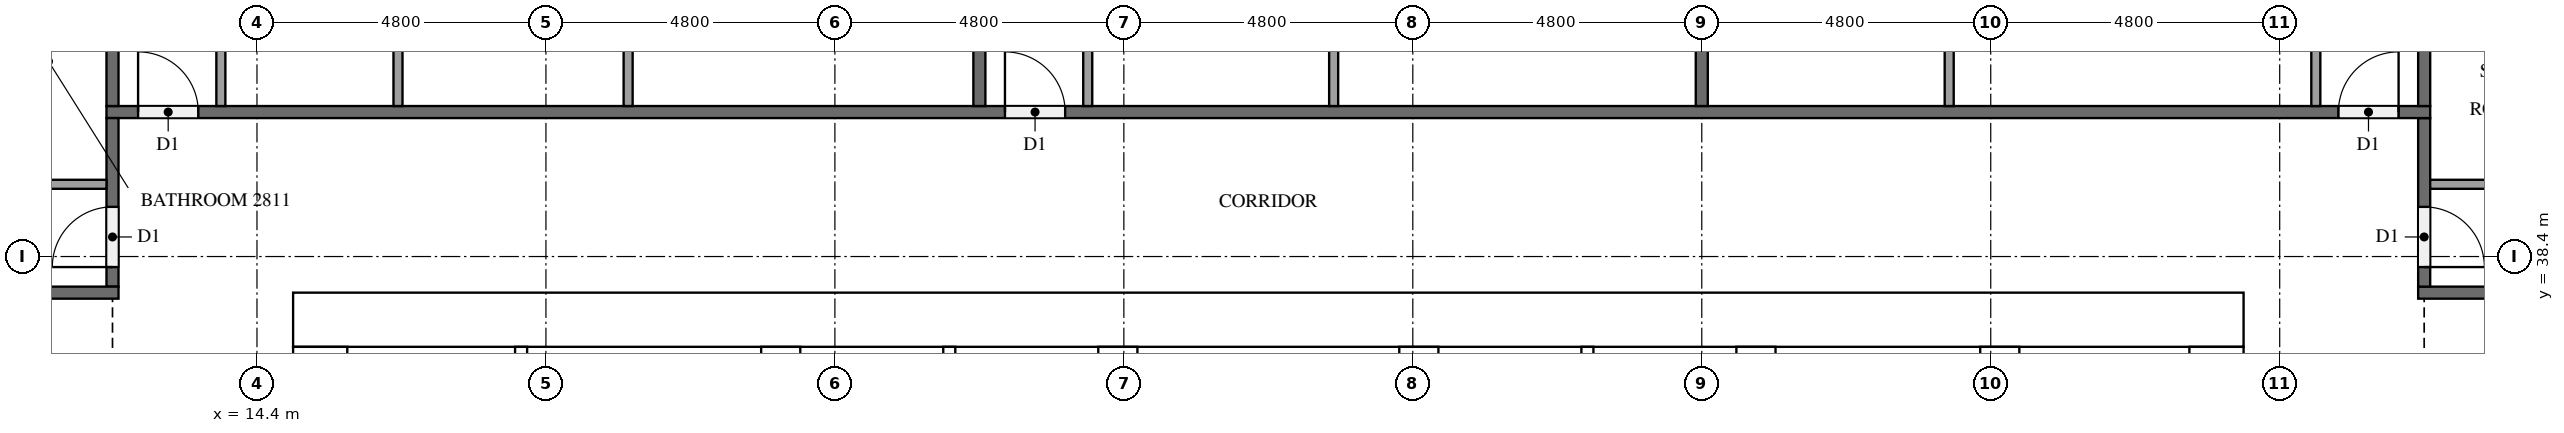
"""IFC4 building model, lengths in metres.
Left out: names, types, materials, properties, quantities, classifications, styles, units other than length and angle.
Written with IfcOpenShell. Run it as: python <this file> out.ifc"""

import sys

from ifc_helpers import new_model, si_unit, direction, frame, frame_2d, origin, place, context, subcontext, project, spatial, rectangle, extrude, element, fill, save


model = new_model("IFC4")
c1 = context("Model", 3, precision=1e-05, world=origin(), true_north=direction((0.0, 1.0)))
c2 = subcontext(c1, "Body", "Model", "MODEL_VIEW")
j1 = project(units=[si_unit("LENGTHUNIT", "METRE"), si_unit("PLANEANGLEUNIT", "RADIAN")], contexts=[c1])
p1 = place(None, origin())
s1 = spatial("IfcSite", under=j1, at=p1, CompositionType="ELEMENT")
p2 = place(p1, origin())
s2 = spatial("IfcBuilding", under=s1, at=p2, CompositionType="ELEMENT")
p3 = place(p2, frame((0.0, 0.0, 110.2)))
s3 = spatial("IfcBuildingStorey", under=s2, at=p3, CompositionType="ELEMENT", Elevation=110.2)
p4 = place(p3, frame((15.0, 37.35, 0.0), z_axis=(0.0, 0.0, 1.0), x_axis=(1.0, 0.0, 0.0)))
e1 = element("IfcWall", 1, at=p4, inside=s3, PredefinedType="SHEAR", context=c2, shape_type="SweptSolid", body=[
    extrude(rectangle(XDim=32.4, YDim=0.9, at=frame_2d((16.2, 0.0))), origin(), (0.0, 0.0, 1.0), 3.1),
])
p5 = place(p4, frame((15.3, 0.0, 0.0)))
e2 = element("IfcOpeningElement", 2, at=p5, cuts=e1, PredefinedType="OPENING", context=c2, shape_type="SweptSolid", body=[
    extrude(rectangle(XDim=1.8, YDim=2.1, at=frame_2d((0.9, 1.05))), frame((0.0, 0.46, 0.0), z_axis=(0.0, -1.0, 0.0), x_axis=(1.0, 0.0, 0.0)), (0.0, 0.0, 1.0), 0.92),
])
p6 = place(p4, frame((1.794, 0.0, 0.0)))
e3 = element("IfcOpeningElement", 3, at=p6, cuts=e1, PredefinedType="OPENING", context=c2, shape_type="SweptSolid", body=[
    extrude(rectangle(XDim=1.0, YDim=2.1, at=frame_2d((0.5, 1.05))), frame((0.0, 0.46, 0.0), z_axis=(0.0, -1.0, 0.0), x_axis=(1.0, 0.0, 0.0)), (0.0, 0.0, 1.0), 0.92),
])
p7 = place(p4, frame((5.331, 0.0, 0.0)))
e4 = element("IfcOpeningElement", 4, at=p7, cuts=e1, PredefinedType="OPENING", context=c2, shape_type="SweptSolid", body=[
    extrude(rectangle(XDim=1.0, YDim=2.1, at=frame_2d((0.5, 1.05))), frame((0.0, 0.46, 0.0), z_axis=(0.0, -1.0, 0.0), x_axis=(1.0, 0.0, 0.0)), (0.0, 0.0, 1.0), 0.92),
])
p8 = place(p3, frame((15.45, 15.9, 0.0), z_axis=(0.0, 0.0, 1.0), x_axis=(0.0, 1.0, 0.0)))
e5 = element("IfcWall", 5, at=p8, inside=s3, PredefinedType="SHEAR", context=c2, shape_type="SweptSolid", body=[
    extrude(rectangle(XDim=21.0, YDim=0.9, at=frame_2d((10.5, 0.0))), origin(), (0.0, 0.0, 1.0), 3.1),
])
p9 = place(p8, frame((4.86, 0.0, 0.0)))
e6 = element("IfcOpeningElement", 6, at=p9, cuts=e5, PredefinedType="OPENING", context=c2, shape_type="SweptSolid", body=[
    extrude(rectangle(XDim=1.2, YDim=2.1, at=frame_2d((0.6, 1.05))), frame((0.0, 0.46, 0.0), z_axis=(0.0, -1.0, 0.0), x_axis=(1.0, 0.0, 0.0)), (0.0, 0.0, 1.0), 0.92),
])
p10 = place(p3, frame((46.95, 15.9, 0.0), z_axis=(0.0, 0.0, 1.0), x_axis=(0.0, 1.0, 0.0)))
e7 = element("IfcWall", 7, at=p10, inside=s3, PredefinedType="SHEAR", context=c2, shape_type="SweptSolid", body=[
    extrude(rectangle(XDim=21.0, YDim=0.9, at=frame_2d((10.5, 0.0))), origin(), (0.0, 0.0, 1.0), 3.1),
])
p11 = place(p10, frame((10.2, 0.0, 0.0)))
e8 = element("IfcOpeningElement", 8, at=p11, cuts=e7, PredefinedType="OPENING", context=c2, shape_type="SweptSolid", body=[
    extrude(rectangle(XDim=1.2, YDim=2.1, at=frame_2d((0.6, 1.05))), frame((0.0, 0.46, 0.0), z_axis=(0.0, -1.0, 0.0), x_axis=(1.0, 0.0, 0.0)), (0.0, 0.0, 1.0), 0.92),
])
p12 = place(p3, frame((23.1, 15.9, 0.0), z_axis=(0.0, 0.0, 1.0), x_axis=(0.0, 1.0, 0.0)))
e9 = element("IfcWall", 9, at=p12, inside=s3, PredefinedType="SHEAR", context=c2, shape_type="SweptSolid", body=[
    extrude(rectangle(XDim=21.0, YDim=0.65, at=frame_2d((10.5, 0.0))), origin(), (0.0, 0.0, 1.0), 3.1),
])
p13 = place(p3, frame((39.3, 27.75, 0.0), z_axis=(0.0, 0.0, 1.0), x_axis=(0.0, 1.0, 0.0)))
e10 = element("IfcWall", 10, at=p13, inside=s3, PredefinedType="SHEAR", context=c2, shape_type="SweptSolid", body=[
    extrude(rectangle(XDim=9.15, YDim=0.65, at=frame_2d((4.575, 0.0))), origin(), (0.0, 0.0, 1.0), 3.1),
])
p14 = place(p3, frame((43.35, 27.75, 0.0), z_axis=(0.0, 0.0, 1.0), x_axis=(0.0, 1.0, 0.0)))
e11 = element("IfcWall", 11, at=p14, inside=s3, PredefinedType="SHEAR", context=c2, shape_type="SweptSolid", body=[
    extrude(rectangle(XDim=9.15, YDim=0.65, at=frame_2d((4.575, 0.0))), origin(), (0.0, 0.0, 1.0), 3.1),
])
p15 = place(p14, frame((7.65, 0.0, 0.0)))
e12 = element("IfcOpeningElement", 12, at=p15, cuts=e11, PredefinedType="OPENING", context=c2, shape_type="SweptSolid", body=[
    extrude(rectangle(XDim=1.2, YDim=2.1, at=frame_2d((0.6, 1.05))), frame((0.0, 0.335, 0.0), z_axis=(0.0, -1.0, 0.0), x_axis=(1.0, 0.0, 0.0)), (0.0, 0.0, 1.0), 0.67),
])
for number, where, z_axis, x_axis in (
    (13, (28.7, 33.875, 0.0), (0.0, 0.0, 1.0), (0.0, 1.0, 0.0)),
    (14, (33.7, 33.875, 0.0), (0.0, 0.0, 1.0), (0.0, 1.0, 0.0)),
):
    element("IfcWall", number, at=place(p3, frame(where, z_axis=z_axis, x_axis=x_axis)), inside=s3, PredefinedType="SHEAR", context=c2, shape_type="SweptSolid", body=[
        extrude(rectangle(XDim=3.025, YDim=0.65, at=frame_2d((1.512, 0.0))), origin(), (0.0, 0.0, 1.0), 3.1),
    ])
for number, where, z_axis, x_axis in (
    (15, (25.9, 33.875, 0.0), (0.0, 0.0, 1.0), (0.0, 1.0, 0.0)),
    (16, (36.5, 33.875, 0.0), (0.0, 0.0, 1.0), (0.0, 1.0, 0.0)),
):
    element("IfcWall", number, at=place(p3, frame(where, z_axis=z_axis, x_axis=x_axis)), inside=s3, PredefinedType="SOLIDWALL", context=c2, shape_type="SweptSolid", body=[
        extrude(rectangle(XDim=3.025, YDim=0.2, at=frame_2d((1.512, 0.0))), origin(), (0.0, 0.0, 1.0), 3.1),
    ])
p16 = place(p3, frame((18.788, 31.575, 0.0), z_axis=(0.0, 0.0, 1.0), x_axis=(0.0, 1.0, 0.0)))
e17 = element("IfcWall", 17, at=p16, inside=s3, PredefinedType="PARTITIONING", context=c2, shape_type="SweptSolid", body=[
    extrude(rectangle(XDim=5.325, YDim=0.2, at=frame_2d((2.663, 0.0))), origin(), (0.0, 0.0, 1.0), 3.1),
])
p17 = place(p3, frame((52.5, 37.8, 0.0), z_axis=(0.0, 0.0, 1.0), x_axis=(-1.0, 0.0, 0.0)))
e18 = element("IfcWall", 18, at=p17, inside=s3, PredefinedType="PARTITIONING", context=c2, shape_type="SweptSolid", body=[
    extrude(rectangle(XDim=2.2, YDim=0.2, at=frame_2d((1.1, 0.0))), origin(), (0.0, 0.0, 1.0), 3.1),
])
p18 = place(p3, frame((50.4, 40.7, 0.0), z_axis=(0.0, 0.0, 1.0), x_axis=(0.0, -1.0, 0.0)))
e19 = element("IfcWall", 19, at=p18, inside=s3, PredefinedType="PARTITIONING", context=c2, shape_type="SweptSolid", body=[
    extrude(rectangle(XDim=2.8, YDim=0.2, at=frame_2d((1.4, 0.0))), origin(), (0.0, 0.0, 1.0), 3.1),
])
p19 = place(p18, frame((1.475, 0.0, 0.0)))
e20 = element("IfcOpeningElement", 20, at=p19, cuts=e19, PredefinedType="OPENING", context=c2, shape_type="SweptSolid", body=[
    extrude(rectangle(XDim=1.0, YDim=2.1, at=frame_2d((0.5, 1.05))), frame((0.0, 0.11, 0.0), z_axis=(0.0, -1.0, 0.0), x_axis=(1.0, 0.0, 0.0)), (0.0, 0.0, 1.0), 0.22),
])
p20 = place(p3, frame((11.9, 40.8, 0.0), z_axis=(0.0, 0.0, 1.0), x_axis=(1.0, 0.0, 0.0)))
e21 = element("IfcWall", 21, at=p20, inside=s3, PredefinedType="PARTITIONING", context=c2, shape_type="SweptSolid", body=[
    extrude(rectangle(XDim=38.6, YDim=0.2, at=frame_2d((19.3, 0.0))), origin(), (0.0, 0.0, 1.0), 3.1),
])
p21 = place(p20, frame((37.075, 0.0, 0.0)))
e22 = element("IfcOpeningElement", 22, at=p21, cuts=e21, PredefinedType="OPENING", context=c2, shape_type="SweptSolid", body=[
    extrude(rectangle(XDim=1.0, YDim=2.1, at=frame_2d((0.5, 1.05))), frame((0.0, 0.11, 0.0), z_axis=(0.0, -1.0, 0.0), x_axis=(1.0, 0.0, 0.0)), (0.0, 0.0, 1.0), 0.22),
])
p22 = place(p20, frame((14.925, 0.0, 0.0)))
e23 = element("IfcOpeningElement", 23, at=p22, cuts=e21, PredefinedType="OPENING", context=c2, shape_type="SweptSolid", body=[
    extrude(rectangle(XDim=1.0, YDim=2.1, at=frame_2d((0.5, 1.05))), frame((0.0, 0.11, 0.0), z_axis=(0.0, -1.0, 0.0), x_axis=(1.0, 0.0, 0.0)), (0.0, 0.0, 1.0), 0.22),
])
p23 = place(p20, frame((0.525, 0.0, 0.0)))
e24 = element("IfcOpeningElement", 24, at=p23, cuts=e21, PredefinedType="OPENING", context=c2, shape_type="SweptSolid", body=[
    extrude(rectangle(XDim=1.0, YDim=2.1, at=frame_2d((0.5, 1.05))), frame((0.0, 0.11, 0.0), z_axis=(0.0, -1.0, 0.0), x_axis=(1.0, 0.0, 0.0)), (0.0, 0.0, 1.0), 0.22),
])
p24 = place(p3, frame((12.0, 37.9, 0.0), z_axis=(0.0, 0.0, 1.0), x_axis=(0.0, 1.0, 0.0)))
e25 = element("IfcWall", 25, at=p24, inside=s3, PredefinedType="PARTITIONING", context=c2, shape_type="SweptSolid", body=[
    extrude(rectangle(XDim=2.8, YDim=0.2, at=frame_2d((1.4, 0.0))), origin(), (0.0, 0.0, 1.0), 3.1),
])
p25 = place(p24, frame((0.325, 0.0, 0.0)))
e26 = element("IfcOpeningElement", 26, at=p25, cuts=e25, PredefinedType="OPENING", context=c2, shape_type="SweptSolid", body=[
    extrude(rectangle(XDim=1.0, YDim=2.1, at=frame_2d((0.5, 1.05))), frame((0.0, 0.11, 0.0), z_axis=(0.0, -1.0, 0.0), x_axis=(1.0, 0.0, 0.0)), (0.0, 0.0, 1.0), 0.22),
])
p26 = place(p3, frame((12.1, 37.8, 0.0), z_axis=(0.0, 0.0, 1.0), x_axis=(-1.0, 0.0, 0.0)))
e27 = element("IfcWall", 27, at=p26, inside=s3, PredefinedType="PARTITIONING", context=c2, shape_type="SweptSolid", body=[
    extrude(rectangle(XDim=2.2, YDim=0.2, at=frame_2d((1.1, 0.0))), origin(), (0.0, 0.0, 1.0), 3.1),
])
p27 = place(p3, frame((50.4, 40.9, 0.0), z_axis=(0.0, 0.0, 1.0), x_axis=(0.0, 1.0, 0.0)))
e28 = element("IfcWall", 28, at=p27, inside=s3, PredefinedType="PARTITIONING", context=c2, shape_type="SweptSolid", body=[
    extrude(rectangle(XDim=11.8, YDim=0.2, at=frame_2d((5.9, 0.0))), origin(), (0.0, 0.0, 1.0), 3.1),
])
p28 = place(p3, frame((38.4, 52.375, 0.0), z_axis=(0.0, 0.0, 1.0), x_axis=(0.0, -1.0, 0.0)))
e29 = element("IfcWall", 29, at=p28, inside=s3, PredefinedType="PARTITIONING", context=c2, shape_type="SweptSolid", body=[
    extrude(rectangle(XDim=11.475, YDim=0.2, at=frame_2d((5.738, 0.0))), origin(), (0.0, 0.0, 1.0), 3.1),
])
for number, where, z_axis, x_axis in (
    (30, (26.4, 52.7, 0.0), (0.0, 0.0, 1.0), (0.0, -1.0, 0.0)),
    (31, (12.0, 52.7, 0.0), (0.0, 0.0, 1.0), (0.0, -1.0, 0.0)),
):
    element("IfcWall", number, at=place(p3, frame(where, z_axis=z_axis, x_axis=x_axis)), inside=s3, PredefinedType="PARTITIONING", context=c2, shape_type="SweptSolid", body=[
        extrude(rectangle(XDim=11.8, YDim=0.2, at=frame_2d((5.9, 0.0))), origin(), (0.0, 0.0, 1.0), 3.1),
    ])
p29 = place(p3, frame((50.5, 39.6, 0.0), z_axis=(0.0, 0.0, 1.0), x_axis=(1.0, 0.0, 0.0)))
e32 = element("IfcWall", 32, at=p29, inside=s3, PredefinedType="PARTITIONING", context=c2, shape_type="SweptSolid", body=[
    extrude(rectangle(XDim=3.125, YDim=0.15, at=frame_2d((1.562, 0.0))), origin(), (0.0, 0.0, 1.0), 3.1),
])
p30 = place(p3, frame((42.51, 40.9, 0.0), z_axis=(0.0, 0.0, 1.0), x_axis=(0.0, 1.0, 0.0)))
e33 = element("IfcWall", 33, at=p30, inside=s3, PredefinedType="PARTITIONING", context=c2, shape_type="SweptSolid", body=[
    extrude(rectangle(XDim=3.875, YDim=0.15, at=frame_2d((1.938, 0.0))), origin(), (0.0, 0.0, 1.0), 3.1),
])
p31 = place(p3, frame((48.6, 40.9, 0.0), z_axis=(0.0, 0.0, 1.0), x_axis=(0.0, 1.0, 0.0)))
e34 = element("IfcWall", 34, at=p31, inside=s3, PredefinedType="PARTITIONING", context=c2, shape_type="SweptSolid", body=[
    extrude(rectangle(XDim=4.025, YDim=0.15, at=frame_2d((2.013, 0.0))), origin(), (0.0, 0.0, 1.0), 3.1),
])
p32 = place(p3, frame((32.285, 40.9, 0.0), z_axis=(0.0, 0.0, 1.0), x_axis=(0.0, 1.0, 0.0)))
e35 = element("IfcWall", 35, at=p32, inside=s3, PredefinedType="PARTITIONING", context=c2, shape_type="SweptSolid", body=[
    extrude(rectangle(XDim=3.275, YDim=0.15, at=frame_2d((1.638, 0.0))), origin(), (0.0, 0.0, 1.0), 3.1),
])
p33 = place(p3, frame((28.2, 40.9, 0.0), z_axis=(0.0, 0.0, 1.0), x_axis=(0.0, 1.0, 0.0)))
e36 = element("IfcWall", 36, at=p33, inside=s3, PredefinedType="PARTITIONING", context=c2, shape_type="SweptSolid", body=[
    extrude(rectangle(XDim=3.425, YDim=0.15, at=frame_2d((1.712, 0.0))), origin(), (0.0, 0.0, 1.0), 3.1),
])
for number, where, z_axis, x_axis in (
    (37, (16.742, 40.9, 0.0), (0.0, 0.0, 1.0), (0.0, 1.0, 0.0)),
    (38, (20.565, 40.9, 0.0), (0.0, 0.0, 1.0), (0.0, 1.0, 0.0)),
):
    element("IfcWall", number, at=place(p3, frame(where, z_axis=z_axis, x_axis=x_axis)), inside=s3, PredefinedType="PARTITIONING", context=c2, shape_type="SweptSolid", body=[
        extrude(rectangle(XDim=3.125, YDim=0.15, at=frame_2d((1.562, 0.0))), origin(), (0.0, 0.0, 1.0), 3.1),
    ])
p34 = place(p3, frame((13.8, 40.9, 0.0), z_axis=(0.0, 0.0, 1.0), x_axis=(0.0, 1.0, 0.0)))
e39 = element("IfcWall", 39, at=p34, inside=s3, PredefinedType="PARTITIONING", context=c2, shape_type="SweptSolid", body=[
    extrude(rectangle(XDim=3.275, YDim=0.15, at=frame_2d((1.638, 0.0))), origin(), (0.0, 0.0, 1.0), 3.1),
])
p35 = place(p3, frame((11.9, 39.6, 0.0), z_axis=(0.0, 0.0, 1.0), x_axis=(-1.0, 0.0, 0.0)))
e40 = element("IfcWall", 40, at=p35, inside=s3, PredefinedType="PARTITIONING", context=c2, shape_type="SweptSolid", body=[
    extrude(rectangle(XDim=2.075, YDim=0.15, at=frame_2d((1.038, 0.0))), origin(), (0.0, 0.0, 1.0), 3.1),
])
p36 = place(p5, origin())
e41 = element("IfcDoor", 41, at=p36, inside=s3, OperationType="DOUBLE_DOOR_SINGLE_SWING", PredefinedType="DOOR", context=c2, shape_type="SweptSolid", body=[
    extrude(rectangle(XDim=1.8, YDim=2.1, at=frame_2d((0.9, 1.05))), frame((0.0, 0.025, 0.0), z_axis=(0.0, -1.0, 0.0), x_axis=(1.0, 0.0, 0.0)), (0.0, 0.0, 1.0), 0.05),
])
fill(e2, e41)
p37 = place(p6, origin())
e42 = element("IfcDoor", 42, at=p37, inside=s3, OperationType="SINGLE_SWING_LEFT", PredefinedType="DOOR", context=c2, shape_type="SweptSolid", body=[
    extrude(rectangle(XDim=1.0, YDim=2.1, at=frame_2d((0.5, 1.05))), frame((0.0, 0.025, 0.0), z_axis=(0.0, -1.0, 0.0), x_axis=(1.0, 0.0, 0.0)), (0.0, 0.0, 1.0), 0.05),
])
fill(e3, e42)
p38 = place(p7, origin())
e43 = element("IfcDoor", 43, at=p38, inside=s3, OperationType="SINGLE_SWING_RIGHT", PredefinedType="DOOR", context=c2, shape_type="SweptSolid", body=[
    extrude(rectangle(XDim=1.0, YDim=2.1, at=frame_2d((0.5, 1.05))), frame((0.0, 0.025, 0.0), z_axis=(0.0, -1.0, 0.0), x_axis=(1.0, 0.0, 0.0)), (0.0, 0.0, 1.0), 0.05),
])
fill(e4, e43)
p39 = place(p19, origin())
e44 = element("IfcDoor", 44, at=p39, inside=s3, OperationType="SINGLE_SWING_RIGHT", PredefinedType="DOOR", context=c2, shape_type="SweptSolid", body=[
    extrude(rectangle(XDim=1.0, YDim=2.1, at=frame_2d((0.5, 1.05))), frame((0.0, 0.025, 0.0), z_axis=(0.0, -1.0, 0.0), x_axis=(1.0, 0.0, 0.0)), (0.0, 0.0, 1.0), 0.05),
])
fill(e20, e44)
p40 = place(p21, origin())
e45 = element("IfcDoor", 45, at=p40, inside=s3, OperationType="SINGLE_SWING_RIGHT", PredefinedType="DOOR", context=c2, shape_type="SweptSolid", body=[
    extrude(rectangle(XDim=1.0, YDim=2.1, at=frame_2d((0.5, 1.05))), frame((0.0, 0.025, 0.0), z_axis=(0.0, -1.0, 0.0), x_axis=(1.0, 0.0, 0.0)), (0.0, 0.0, 1.0), 0.05),
])
fill(e22, e45)
p41 = place(p22, origin())
e46 = element("IfcDoor", 46, at=p41, inside=s3, OperationType="SINGLE_SWING_LEFT", PredefinedType="DOOR", context=c2, shape_type="SweptSolid", body=[
    extrude(rectangle(XDim=1.0, YDim=2.1, at=frame_2d((0.5, 1.05))), frame((0.0, 0.025, 0.0), z_axis=(0.0, -1.0, 0.0), x_axis=(1.0, 0.0, 0.0)), (0.0, 0.0, 1.0), 0.05),
])
fill(e23, e46)
p42 = place(p23, origin())
e47 = element("IfcDoor", 47, at=p42, inside=s3, OperationType="SINGLE_SWING_LEFT", PredefinedType="DOOR", context=c2, shape_type="SweptSolid", body=[
    extrude(rectangle(XDim=1.0, YDim=2.1, at=frame_2d((0.5, 1.05))), frame((0.0, 0.025, 0.0), z_axis=(0.0, -1.0, 0.0), x_axis=(1.0, 0.0, 0.0)), (0.0, 0.0, 1.0), 0.05),
])
fill(e24, e47)
p43 = place(p25, origin())
e48 = element("IfcDoor", 48, at=p43, inside=s3, OperationType="SINGLE_SWING_LEFT", PredefinedType="DOOR", context=c2, shape_type="SweptSolid", body=[
    extrude(rectangle(XDim=1.0, YDim=2.1, at=frame_2d((0.5, 1.05))), frame((0.0, 0.025, 0.0), z_axis=(0.0, -1.0, 0.0), x_axis=(1.0, 0.0, 0.0)), (0.0, 0.0, 1.0), 0.05),
])
fill(e26, e48)
save(model, sys.argv[1])
